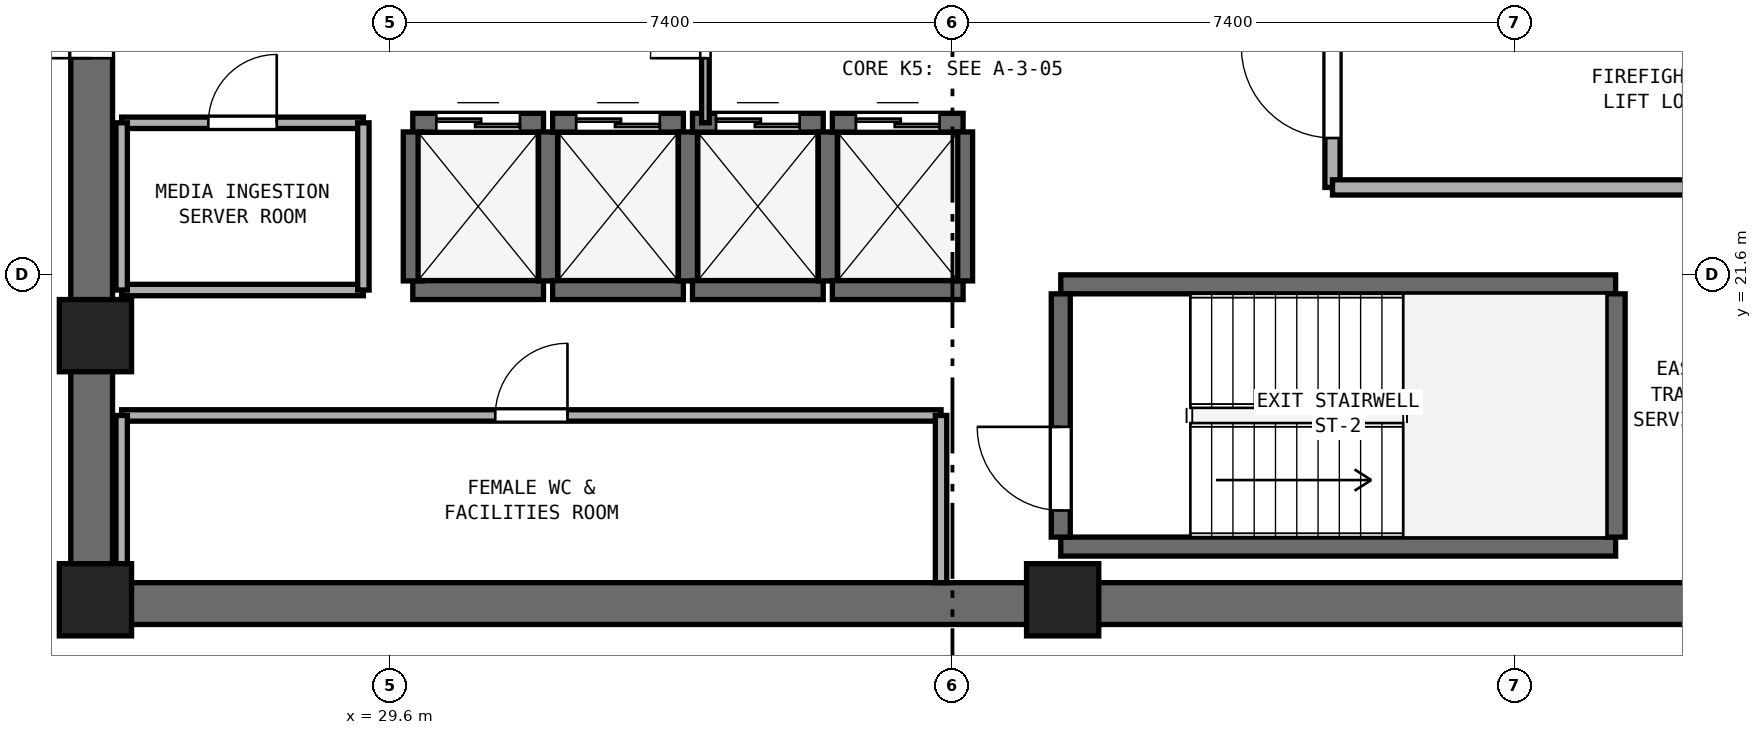
"""IFC4 building model, lengths in metres.
Left out: names, types, materials, properties, quantities, classifications, styles, units other than length and angle.
Written with IfcOpenShell. Run it as: python <this file> out.ifc"""

import sys

from ifc_helpers import new_model, si_unit, direction, frame, frame_2d, origin, origin_2d, place, context, subcontext, project, spatial, rectangle, extrude, element, fill, save


model = new_model("IFC4")
c1 = context("Model", 3, precision=1e-05, world=origin(), true_north=direction((0.0, 1.0)))
c2 = subcontext(c1, "Body", "Model", "MODEL_VIEW")
j1 = project(units=[si_unit("LENGTHUNIT", "METRE"), si_unit("PLANEANGLEUNIT", "RADIAN")], contexts=[c1])
p1 = place(None, origin())
s1 = spatial("IfcSite", under=j1, at=p1, CompositionType="ELEMENT")
p2 = place(p1, origin())
s2 = spatial("IfcBuilding", under=s1, at=p2, CompositionType="ELEMENT")
p3 = place(p2, frame((0.0, 0.0, 174.4)))
s3 = spatial("IfcBuildingStorey", under=s2, at=p3, CompositionType="ELEMENT", Elevation=174.4)
p4 = place(p3, frame((25.4, 17.275, 0.0), z_axis=(0.0, 0.0, 1.0), x_axis=(1.0, 0.0, 0.0)))
e1 = element("IfcWall", 1, at=p4, inside=s3, PredefinedType="SHEAR", context=c2, shape_type="SweptSolid", body=[
    extrude(rectangle(XDim=23.2, YDim=0.55, at=frame_2d((11.6, 0.0))), origin(), (0.0, 0.0, 1.0), 3.54),
])
p5 = place(p3, frame((25.675, 17.55, 0.0), z_axis=(0.0, 0.0, 1.0), x_axis=(0.0, 1.0, 0.0)))
e2 = element("IfcWall", 2, at=p5, inside=s3, PredefinedType="SHEAR", context=c2, shape_type="SweptSolid", body=[
    extrude(rectangle(XDim=15.3, YDim=0.55, at=frame_2d((7.65, 0.0))), origin(), (0.0, 0.0, 1.0), 3.54),
])
p6 = place(p5, frame((6.9, 0.0, 0.0)))
e3 = element("IfcOpeningElement", 3, at=p6, cuts=e2, PredefinedType="OPENING", context=c2, shape_type="SweptSolid", body=[
    extrude(rectangle(XDim=1.5, YDim=2.15, at=frame_2d((0.75, 1.075))), frame((0.0, 0.285, 0.0), z_axis=(0.0, -1.0, 0.0), x_axis=(1.0, 0.0, 0.0)), (0.0, 0.0, 1.0), 0.57),
])
for number, where, z_axis, x_axis in (
    (4, (25.725, 17.325, 0.0), (0.0, 0.0, 1.0), (1.0, 0.0, 0.0)),
    (5, (38.45, 17.325, 0.0), (0.0, 0.0, 1.0), (1.0, 0.0, 0.0)),
    (6, (25.725, 20.8, 0.0), (0.0, 0.0, 1.0), (1.0, 0.0, 0.0)),
):
    element("IfcColumn", number, at=place(p3, frame(where, z_axis=z_axis, x_axis=x_axis)), inside=s3, PredefinedType="PILASTER", context=c2, shape_type="SweptSolid", body=[
        extrude(rectangle(XDim=0.95, YDim=0.95, at=origin_2d()), origin(), (0.0, 0.0, 1.0), 3.8),
    ])
for number, where, z_axis, x_axis in (
    (7, (38.425, 18.025, 0.0), (0.0, 0.0, 1.0), (1.0, 0.0, 0.0)),
    (8, (38.425, 21.475, 0.0), (0.0, 0.0, 1.0), (1.0, 0.0, 0.0)),
):
    element("IfcWall", number, at=place(p3, frame(where, z_axis=z_axis, x_axis=x_axis)), inside=s3, PredefinedType="SHEAR", context=c2, shape_type="SweptSolid", body=[
        extrude(rectangle(XDim=7.3, YDim=0.25, at=frame_2d((3.65, 0.0))), origin(), (0.0, 0.0, 1.0), 3.54),
    ])
p7 = place(p3, frame((38.425, 18.15, 0.0), z_axis=(0.0, 0.0, 1.0), x_axis=(0.0, 1.0, 0.0)))
e9 = element("IfcWall", 9, at=p7, inside=s3, PredefinedType="SHEAR", context=c2, shape_type="SweptSolid", body=[
    extrude(rectangle(XDim=3.2, YDim=0.25, at=frame_2d((1.6, 0.0))), origin(), (0.0, 0.0, 1.0), 3.54),
])
p8 = place(p7, frame((0.35, 0.0, 0.0)))
e10 = element("IfcOpeningElement", 10, at=p8, cuts=e9, PredefinedType="OPENING", context=c2, shape_type="SweptSolid", body=[
    extrude(rectangle(XDim=1.1, YDim=2.15, at=frame_2d((0.55, 1.075))), frame((0.0, 0.135, 0.0), z_axis=(0.0, -1.0, 0.0), x_axis=(1.0, 0.0, 0.0)), (0.0, 0.0, 1.0), 0.27),
])
p9 = place(p3, frame((45.725, 18.15, 0.0), z_axis=(0.0, 0.0, 1.0), x_axis=(0.0, 1.0, 0.0)))
e11 = element("IfcWall", 11, at=p9, inside=s3, PredefinedType="SHEAR", context=c2, shape_type="SweptSolid", body=[
    extrude(rectangle(XDim=3.2, YDim=0.25, at=frame_2d((1.6, 0.0))), origin(), (0.0, 0.0, 1.0), 3.54),
])
p10 = place(p3, frame((29.9, 21.4, 0.0), z_axis=(0.0, 0.0, 1.0), x_axis=(1.0, 0.0, 0.0)))
e12 = element("IfcWall", 12, at=p10, inside=s3, PredefinedType="SHEAR", context=c2, shape_type="SweptSolid", body=[
    extrude(rectangle(XDim=1.72, YDim=0.25, at=frame_2d((0.86, 0.0))), origin(), (0.0, 0.0, 1.0), 3.54),
])
p11 = place(p3, frame((29.9, 23.6, 0.0), z_axis=(0.0, 0.0, 1.0), x_axis=(1.0, 0.0, 0.0)))
e13 = element("IfcWall", 13, at=p11, inside=s3, PredefinedType="SHEAR", context=c2, shape_type="SweptSolid", body=[
    extrude(rectangle(XDim=1.72, YDim=0.25, at=frame_2d((0.86, 0.0))), origin(), (0.0, 0.0, 1.0), 3.54),
])
p12 = place(p11, frame((0.31, 0.0, 0.0)))
e14 = element("IfcOpeningElement", 14, at=p12, cuts=e13, PredefinedType="OPENING", context=c2, shape_type="SweptSolid", body=[
    extrude(rectangle(XDim=1.1, YDim=2.15, at=frame_2d((0.55, 1.075))), frame((0.0, 0.135, 0.0), z_axis=(0.0, -1.0, 0.0), x_axis=(1.0, 0.0, 0.0)), (0.0, 0.0, 1.0), 0.27),
])
for number, where, z_axis, x_axis in (
    (15, (29.9, 21.52, 0.0), (0.0, 0.0, 1.0), (0.0, 1.0, 0.0)),
    (16, (31.68, 21.52, 0.0), (0.0, 0.0, 1.0), (0.0, 1.0, 0.0)),
):
    element("IfcWall", number, at=place(p3, frame(where, z_axis=z_axis, x_axis=x_axis)), inside=s3, PredefinedType="SHEAR", context=c2, shape_type="SweptSolid", body=[
        extrude(rectangle(XDim=1.96, YDim=0.25, at=frame_2d((0.98, 0.0))), origin(), (0.0, 0.0, 1.0), 3.54),
    ])
p13 = place(p3, frame((31.74, 21.4, 0.0), z_axis=(0.0, 0.0, 1.0), x_axis=(1.0, 0.0, 0.0)))
e17 = element("IfcWall", 17, at=p13, inside=s3, PredefinedType="SHEAR", context=c2, shape_type="SweptSolid", body=[
    extrude(rectangle(XDim=1.72, YDim=0.25, at=frame_2d((0.86, 0.0))), origin(), (0.0, 0.0, 1.0), 3.54),
])
p14 = place(p3, frame((31.74, 23.6, 0.0), z_axis=(0.0, 0.0, 1.0), x_axis=(1.0, 0.0, 0.0)))
e18 = element("IfcWall", 18, at=p14, inside=s3, PredefinedType="SHEAR", context=c2, shape_type="SweptSolid", body=[
    extrude(rectangle(XDim=1.72, YDim=0.25, at=frame_2d((0.86, 0.0))), origin(), (0.0, 0.0, 1.0), 3.54),
])
p15 = place(p14, frame((0.31, 0.0, 0.0)))
e19 = element("IfcOpeningElement", 19, at=p15, cuts=e18, PredefinedType="OPENING", context=c2, shape_type="SweptSolid", body=[
    extrude(rectangle(XDim=1.1, YDim=2.15, at=frame_2d((0.55, 1.075))), frame((0.0, 0.135, 0.0), z_axis=(0.0, -1.0, 0.0), x_axis=(1.0, 0.0, 0.0)), (0.0, 0.0, 1.0), 0.27),
])
p16 = place(p3, frame((33.52, 21.52, 0.0), z_axis=(0.0, 0.0, 1.0), x_axis=(0.0, 1.0, 0.0)))
e20 = element("IfcWall", 20, at=p16, inside=s3, PredefinedType="SHEAR", context=c2, shape_type="SweptSolid", body=[
    extrude(rectangle(XDim=1.96, YDim=0.25, at=frame_2d((0.98, 0.0))), origin(), (0.0, 0.0, 1.0), 3.54),
])
p17 = place(p3, frame((33.58, 21.4, 0.0), z_axis=(0.0, 0.0, 1.0), x_axis=(1.0, 0.0, 0.0)))
e21 = element("IfcWall", 21, at=p17, inside=s3, PredefinedType="SHEAR", context=c2, shape_type="SweptSolid", body=[
    extrude(rectangle(XDim=1.72, YDim=0.25, at=frame_2d((0.86, 0.0))), origin(), (0.0, 0.0, 1.0), 3.54),
])
p18 = place(p3, frame((33.58, 23.6, 0.0), z_axis=(0.0, 0.0, 1.0), x_axis=(1.0, 0.0, 0.0)))
e22 = element("IfcWall", 22, at=p18, inside=s3, PredefinedType="SHEAR", context=c2, shape_type="SweptSolid", body=[
    extrude(rectangle(XDim=1.72, YDim=0.25, at=frame_2d((0.86, 0.0))), origin(), (0.0, 0.0, 1.0), 3.54),
])
p19 = place(p18, frame((0.31, 0.0, 0.0)))
e23 = element("IfcOpeningElement", 23, at=p19, cuts=e22, PredefinedType="OPENING", context=c2, shape_type="SweptSolid", body=[
    extrude(rectangle(XDim=1.1, YDim=2.15, at=frame_2d((0.55, 1.075))), frame((0.0, 0.135, 0.0), z_axis=(0.0, -1.0, 0.0), x_axis=(1.0, 0.0, 0.0)), (0.0, 0.0, 1.0), 0.27),
])
p20 = place(p3, frame((35.36, 21.52, 0.0), z_axis=(0.0, 0.0, 1.0), x_axis=(0.0, 1.0, 0.0)))
e24 = element("IfcWall", 24, at=p20, inside=s3, PredefinedType="SHEAR", context=c2, shape_type="SweptSolid", body=[
    extrude(rectangle(XDim=1.96, YDim=0.25, at=frame_2d((0.98, 0.0))), origin(), (0.0, 0.0, 1.0), 3.54),
])
p21 = place(p3, frame((35.42, 21.4, 0.0), z_axis=(0.0, 0.0, 1.0), x_axis=(1.0, 0.0, 0.0)))
e25 = element("IfcWall", 25, at=p21, inside=s3, PredefinedType="SHEAR", context=c2, shape_type="SweptSolid", body=[
    extrude(rectangle(XDim=1.72, YDim=0.25, at=frame_2d((0.86, 0.0))), origin(), (0.0, 0.0, 1.0), 3.54),
])
p22 = place(p3, frame((35.42, 23.6, 0.0), z_axis=(0.0, 0.0, 1.0), x_axis=(1.0, 0.0, 0.0)))
e26 = element("IfcWall", 26, at=p22, inside=s3, PredefinedType="SHEAR", context=c2, shape_type="SweptSolid", body=[
    extrude(rectangle(XDim=1.72, YDim=0.25, at=frame_2d((0.86, 0.0))), origin(), (0.0, 0.0, 1.0), 3.54),
])
p23 = place(p22, frame((0.31, 0.0, 0.0)))
e27 = element("IfcOpeningElement", 27, at=p23, cuts=e26, PredefinedType="OPENING", context=c2, shape_type="SweptSolid", body=[
    extrude(rectangle(XDim=1.1, YDim=2.15, at=frame_2d((0.55, 1.075))), frame((0.0, 0.135, 0.0), z_axis=(0.0, -1.0, 0.0), x_axis=(1.0, 0.0, 0.0)), (0.0, 0.0, 1.0), 0.27),
])
p24 = place(p3, frame((37.14, 21.52, 0.0), z_axis=(0.0, 0.0, 1.0), x_axis=(0.0, 1.0, 0.0)))
e28 = element("IfcWall", 28, at=p24, inside=s3, PredefinedType="SHEAR", context=c2, shape_type="SweptSolid", body=[
    extrude(rectangle(XDim=1.96, YDim=0.25, at=frame_2d((0.98, 0.0))), origin(), (0.0, 0.0, 1.0), 3.54),
])
p25 = place(p3, frame((42.0, 22.75, 0.0), z_axis=(0.0, 0.0, 1.0), x_axis=(0.0, 1.0, 0.0)))
e29 = element("IfcWall", 29, at=p25, inside=s3, PredefinedType="SOLIDWALL", context=c2, shape_type="SweptSolid", body=[
    extrude(rectangle(XDim=6.05, YDim=0.2, at=frame_2d((3.025, 0.0))), origin(), (0.0, 0.0, 1.0), 3.54),
])
p26 = place(p25, frame((0.65, 0.0, 0.0)))
e30 = element("IfcOpeningElement", 30, at=p26, cuts=e29, PredefinedType="OPENING", context=c2, shape_type="SweptSolid", body=[
    extrude(rectangle(XDim=1.2, YDim=2.15, at=frame_2d((0.6, 1.075))), frame((0.0, 0.11, 0.0), z_axis=(0.0, -1.0, 0.0), x_axis=(1.0, 0.0, 0.0)), (0.0, 0.0, 1.0), 0.22),
])
p27 = place(p3, frame((42.0, 22.75, 0.0), z_axis=(0.0, 0.0, 1.0), x_axis=(1.0, 0.0, 0.0)))
e31 = element("IfcWall", 31, at=p27, inside=s3, PredefinedType="SOLIDWALL", context=c2, shape_type="SweptSolid", body=[
    extrude(rectangle(XDim=6.05, YDim=0.2, at=frame_2d((3.025, 0.0))), origin(), (0.0, 0.0, 1.0), 3.54),
])
p28 = place(p3, frame((26.07, 19.75, 0.0), z_axis=(0.0, 0.0, 1.0), x_axis=(1.0, 0.0, 0.0)))
e32 = element("IfcWall", 32, at=p28, inside=s3, PredefinedType="PARTITIONING", context=c2, shape_type="SweptSolid", body=[
    extrude(rectangle(XDim=10.78, YDim=0.15, at=frame_2d((5.39, 0.0))), origin(), (0.0, 0.0, 1.0), 3.54),
])
p29 = place(p28, frame((4.915, 0.0, 0.0)))
e33 = element("IfcOpeningElement", 33, at=p29, cuts=e32, PredefinedType="OPENING", context=c2, shape_type="SweptSolid", body=[
    extrude(rectangle(XDim=0.95, YDim=2.1, at=frame_2d((0.475, 1.05))), frame((0.0, 0.085, 0.0), z_axis=(0.0, -1.0, 0.0), x_axis=(1.0, 0.0, 0.0)), (0.0, 0.0, 1.0), 0.17),
])
p30 = place(p3, frame((26.07, 17.55, 0.0), z_axis=(0.0, 0.0, 1.0), x_axis=(0.0, 1.0, 0.0)))
e34 = element("IfcWall", 34, at=p30, inside=s3, PredefinedType="PARTITIONING", context=c2, shape_type="SweptSolid", body=[
    extrude(rectangle(XDim=2.2, YDim=0.15, at=frame_2d((1.1, 0.0))), origin(), (0.0, 0.0, 1.0), 2.64),
])
p31 = place(p3, frame((36.85, 17.55, 0.0), z_axis=(0.0, 0.0, 1.0), x_axis=(0.0, 1.0, 0.0)))
e35 = element("IfcWall", 35, at=p31, inside=s3, PredefinedType="PARTITIONING", context=c2, shape_type="SweptSolid", body=[
    extrude(rectangle(XDim=2.2, YDim=0.15, at=frame_2d((1.1, 0.0))), origin(), (0.0, 0.0, 1.0), 3.54),
])
p32 = place(p3, frame((26.07, 21.4, 0.0), z_axis=(0.0, 0.0, 1.0), x_axis=(1.0, 0.0, 0.0)))
e36 = element("IfcWall", 36, at=p32, inside=s3, PredefinedType="PARTITIONING", context=c2, shape_type="SweptSolid", body=[
    extrude(rectangle(XDim=3.18, YDim=0.15, at=frame_2d((1.59, 0.0))), origin(), (0.0, 0.0, 1.0), 3.54),
])
p33 = place(p3, frame((26.07, 23.6, 0.0), z_axis=(0.0, 0.0, 1.0), x_axis=(1.0, 0.0, 0.0)))
e37 = element("IfcWall", 37, at=p33, inside=s3, PredefinedType="PARTITIONING", context=c2, shape_type="SweptSolid", body=[
    extrude(rectangle(XDim=3.18, YDim=0.15, at=frame_2d((1.59, 0.0))), origin(), (0.0, 0.0, 1.0), 3.54),
])
p34 = place(p33, frame((1.14, 0.0, 0.0)))
e38 = element("IfcOpeningElement", 38, at=p34, cuts=e37, PredefinedType="OPENING", context=c2, shape_type="SweptSolid", body=[
    extrude(rectangle(XDim=0.9, YDim=2.1, at=frame_2d((0.45, 1.05))), frame((0.0, 0.085, 0.0), z_axis=(0.0, -1.0, 0.0), x_axis=(1.0, 0.0, 0.0)), (0.0, 0.0, 1.0), 0.17),
])
p35 = place(p3, frame((26.07, 21.4, 0.0), z_axis=(0.0, 0.0, 1.0), x_axis=(0.0, 1.0, 0.0)))
e39 = element("IfcWall", 39, at=p35, inside=s3, PredefinedType="PARTITIONING", context=c2, shape_type="SweptSolid", body=[
    extrude(rectangle(XDim=2.2, YDim=0.15, at=frame_2d((1.1, 0.0))), origin(), (0.0, 0.0, 1.0), 2.64),
])
p36 = place(p3, frame((29.25, 21.4, 0.0), z_axis=(0.0, 0.0, 1.0), x_axis=(0.0, 1.0, 0.0)))
e40 = element("IfcWall", 40, at=p36, inside=s3, PredefinedType="PARTITIONING", context=c2, shape_type="SweptSolid", body=[
    extrude(rectangle(XDim=2.2, YDim=0.15, at=frame_2d((1.1, 0.0))), origin(), (0.0, 0.0, 1.0), 3.54),
])
p37 = place(p3, frame((33.75, 23.6, 0.0), z_axis=(0.0, 0.0, 1.0), x_axis=(0.0, 1.0, 0.0)))
e41 = element("IfcWall", 41, at=p37, inside=s3, PredefinedType="PARTITIONING", context=c2, shape_type="SweptSolid", body=[
    extrude(rectangle(XDim=3.2, YDim=0.1, at=frame_2d((1.6, 0.0))), origin(), (0.0, 0.0, 1.0), 3.54),
])
p38 = place(p37, frame((0.85, 0.0, 0.0)))
e42 = element("IfcOpeningElement", 42, at=p38, cuts=e41, PredefinedType="OPENING", context=c2, shape_type="SweptSolid", body=[
    extrude(rectangle(XDim=1.45, YDim=2.12, at=frame_2d((0.725, 1.06))), frame((0.0, 0.06, 0.0), z_axis=(0.0, -1.0, 0.0), x_axis=(1.0, 0.0, 0.0)), (0.0, 0.0, 1.0), 0.12),
])
p39 = place(p8, origin())
e43 = element("IfcDoor", 43, at=p39, inside=s3, OperationType="SINGLE_SWING_RIGHT", PredefinedType="DOOR", context=c2, shape_type="SweptSolid", body=[
    extrude(rectangle(XDim=1.1, YDim=2.15, at=frame_2d((0.55, 1.075))), frame((0.0, 0.025, 0.0), z_axis=(0.0, -1.0, 0.0), x_axis=(1.0, 0.0, 0.0)), (0.0, 0.0, 1.0), 0.05),
])
fill(e10, e43)
p40 = place(p12, origin())
e44 = element("IfcDoor", 44, at=p40, inside=s3, OperationType="DOUBLE_DOOR_SLIDING", PredefinedType="DOOR", context=c2, shape_type="SweptSolid", body=[
    extrude(rectangle(XDim=1.1, YDim=2.15, at=frame_2d((0.55, 1.075))), frame((0.0, 0.025, 0.0), z_axis=(0.0, -1.0, 0.0), x_axis=(1.0, 0.0, 0.0)), (0.0, 0.0, 1.0), 0.05),
])
fill(e14, e44)
p41 = place(p15, origin())
e45 = element("IfcDoor", 45, at=p41, inside=s3, OperationType="DOUBLE_DOOR_SLIDING", PredefinedType="DOOR", context=c2, shape_type="SweptSolid", body=[
    extrude(rectangle(XDim=1.1, YDim=2.15, at=frame_2d((0.55, 1.075))), frame((0.0, 0.025, 0.0), z_axis=(0.0, -1.0, 0.0), x_axis=(1.0, 0.0, 0.0)), (0.0, 0.0, 1.0), 0.05),
])
fill(e19, e45)
p42 = place(p19, origin())
e46 = element("IfcDoor", 46, at=p42, inside=s3, OperationType="DOUBLE_DOOR_SLIDING", PredefinedType="DOOR", context=c2, shape_type="SweptSolid", body=[
    extrude(rectangle(XDim=1.1, YDim=2.15, at=frame_2d((0.55, 1.075))), frame((0.0, 0.025, 0.0), z_axis=(0.0, -1.0, 0.0), x_axis=(1.0, 0.0, 0.0)), (0.0, 0.0, 1.0), 0.05),
])
fill(e23, e46)
p43 = place(p23, origin())
e47 = element("IfcDoor", 47, at=p43, inside=s3, OperationType="DOUBLE_DOOR_SLIDING", PredefinedType="DOOR", context=c2, shape_type="SweptSolid", body=[
    extrude(rectangle(XDim=1.1, YDim=2.15, at=frame_2d((0.55, 1.075))), frame((0.0, 0.025, 0.0), z_axis=(0.0, -1.0, 0.0), x_axis=(1.0, 0.0, 0.0)), (0.0, 0.0, 1.0), 0.05),
])
fill(e27, e47)
p44 = place(p26, origin())
e48 = element("IfcDoor", 48, at=p44, inside=s3, OperationType="SINGLE_SWING_RIGHT", PredefinedType="DOOR", context=c2, shape_type="SweptSolid", body=[
    extrude(rectangle(XDim=1.2, YDim=2.15, at=frame_2d((0.6, 1.075))), frame((0.0, 0.025, 0.0), z_axis=(0.0, -1.0, 0.0), x_axis=(1.0, 0.0, 0.0)), (0.0, 0.0, 1.0), 0.05),
])
fill(e30, e48)
p45 = place(p6, origin())
e49 = element("IfcDoor", 49, at=p45, inside=s3, OperationType="DOUBLE_DOOR_SINGLE_SWING", PredefinedType="DOOR", context=c2, shape_type="SweptSolid", body=[
    extrude(rectangle(XDim=1.5, YDim=2.15, at=frame_2d((0.75, 1.075))), frame((0.0, 0.025, 0.0), z_axis=(0.0, -1.0, 0.0), x_axis=(1.0, 0.0, 0.0)), (0.0, 0.0, 1.0), 0.05),
])
fill(e3, e49)
p46 = place(p29, origin())
e50 = element("IfcDoor", 50, at=p46, inside=s3, OperationType="SINGLE_SWING_RIGHT", PredefinedType="DOOR", context=c2, shape_type="SweptSolid", body=[
    extrude(rectangle(XDim=0.95, YDim=2.1, at=frame_2d((0.475, 1.05))), frame((0.0, 0.025, 0.0), z_axis=(0.0, -1.0, 0.0), x_axis=(1.0, 0.0, 0.0)), (0.0, 0.0, 1.0), 0.05),
])
fill(e33, e50)
p47 = place(p34, origin())
e51 = element("IfcDoor", 51, at=p47, inside=s3, OperationType="SINGLE_SWING_RIGHT", PredefinedType="DOOR", context=c2, shape_type="SweptSolid", body=[
    extrude(rectangle(XDim=0.9, YDim=2.1, at=frame_2d((0.45, 1.05))), frame((0.0, 0.025, 0.0), z_axis=(0.0, -1.0, 0.0), x_axis=(1.0, 0.0, 0.0)), (0.0, 0.0, 1.0), 0.05),
])
fill(e38, e51)
p48 = place(p38, origin())
e52 = element("IfcDoor", 52, at=p48, inside=s3, OperationType="DOUBLE_DOOR_SINGLE_SWING", PredefinedType="DOOR", context=c2, shape_type="SweptSolid", body=[
    extrude(rectangle(XDim=1.45, YDim=2.12, at=frame_2d((0.725, 1.06))), frame((0.0, 0.025, 0.0), z_axis=(0.0, -1.0, 0.0), x_axis=(1.0, 0.0, 0.0)), (0.0, 0.0, 1.0), 0.05),
])
fill(e42, e52)
save(model, sys.argv[1])
